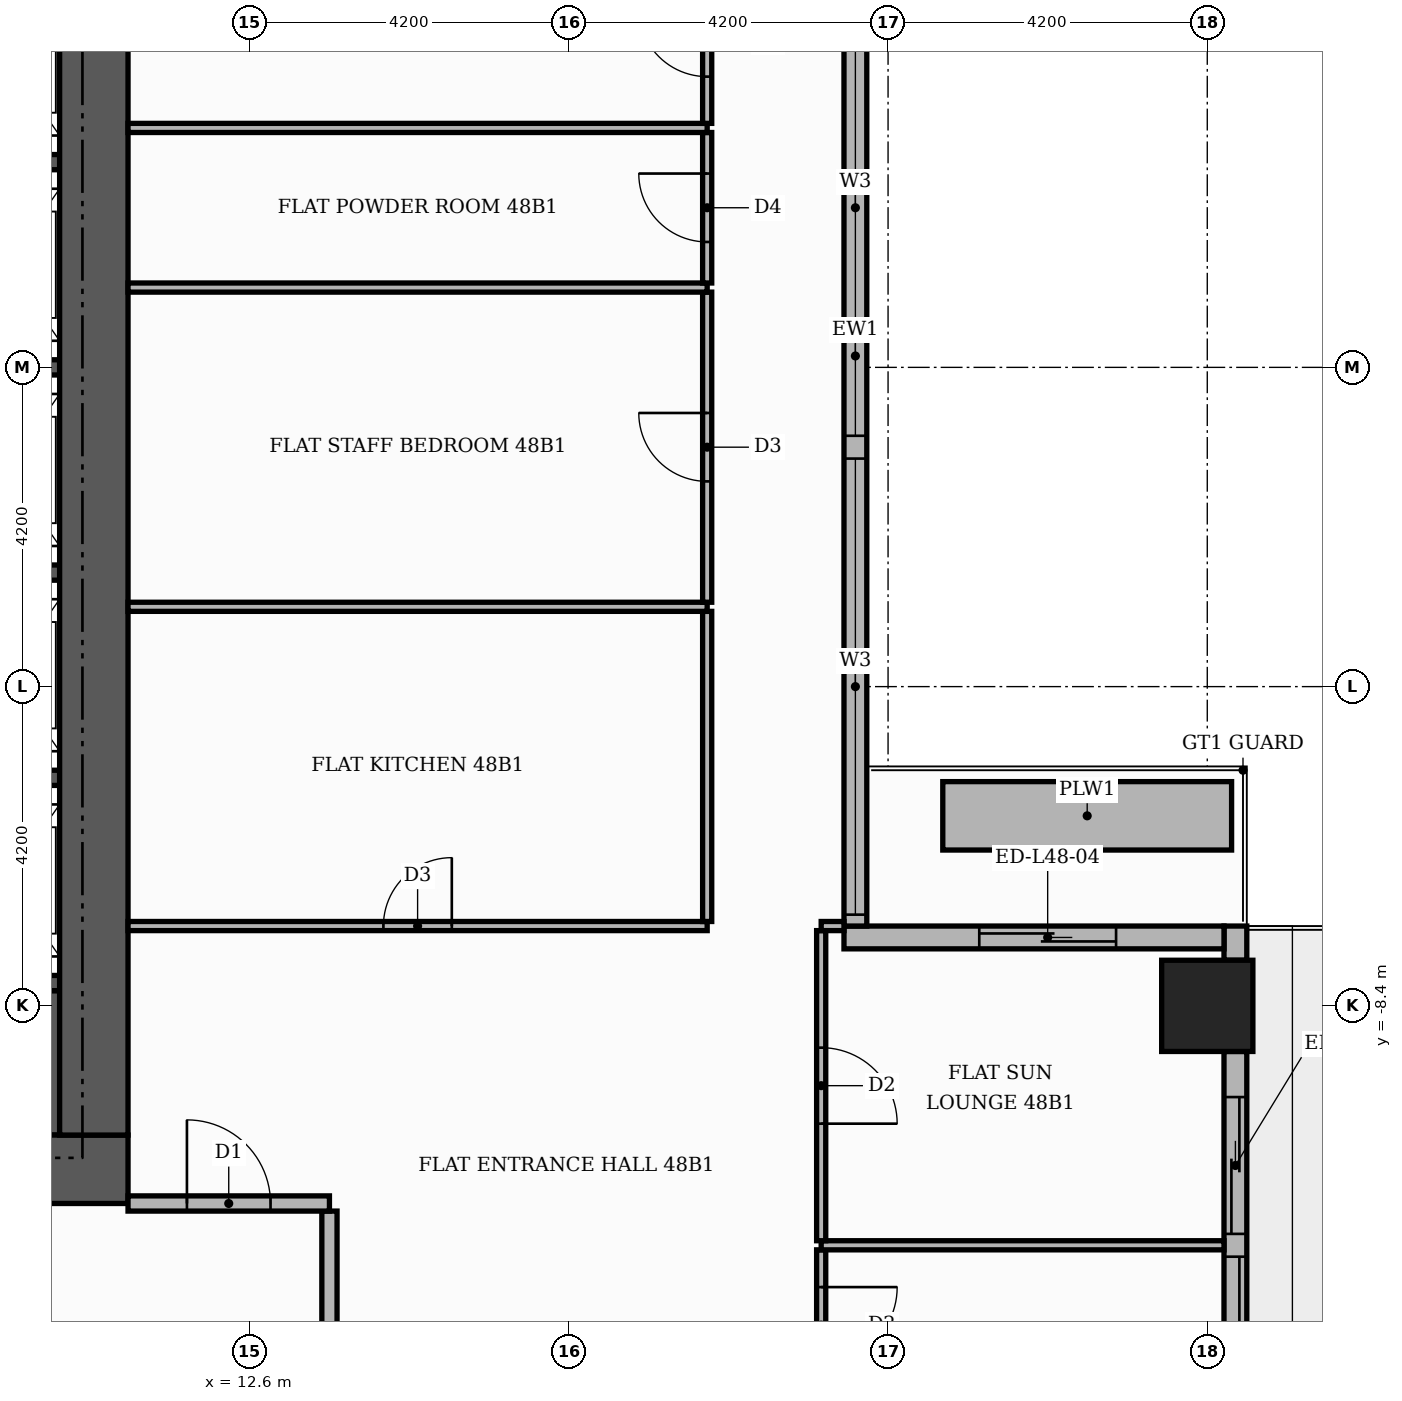
"""IFC4 building model, lengths in metres.
Left out: names, types, materials, properties, quantities, classifications, styles, units other than length and angle.
Written with IfcOpenShell. Run it as: python <this file> out.ifc"""

import sys

from ifc_helpers import new_model, si_unit, direction, frame, frame_2d, origin, origin_2d, place, context, subcontext, project, spatial, rectangle, extrude, element, fill, save


model = new_model("IFC4")
c1 = context("Model", 3, precision=1e-05, world=origin(), true_north=direction((0.0, 1.0)))
c2 = subcontext(c1, "Body", "Model", "MODEL_VIEW")
j1 = project(units=[si_unit("LENGTHUNIT", "METRE"), si_unit("PLANEANGLEUNIT", "RADIAN")], contexts=[c1])
p1 = place(None, origin())
s1 = spatial("IfcSite", under=j1, at=p1, CompositionType="ELEMENT")
p2 = place(p1, origin())
s2 = spatial("IfcBuilding", under=s1, at=p2, CompositionType="ELEMENT")
p3 = place(p2, frame((0.0, 0.0, 204.0)))
s3 = spatial("IfcBuildingStorey", under=s2, at=p3, CompositionType="ELEMENT", Elevation=204.0)
p4 = place(p3, frame((5.5, -9.15, 0.0), z_axis=(0.0, 0.0, 1.0), x_axis=(1.0, 0.0, 0.0)))
e1 = element("IfcWall", 1, at=p4, inside=s3, PredefinedType="SHEAR", context=c2, shape_type="SweptSolid", body=[
    extrude(rectangle(XDim=4.6, YDim=1.9, at=frame_2d((2.3, 0.0))), origin(), (0.0, 0.0, 1.0), 3.48),
])
for number, where, z_axis, x_axis in (
    (2, (8.1, -8.1, 0.0), (0.0, 0.0, 1.0), (1.0, 0.0, 0.0)),
    (3, (8.1, -5.4, 0.0), (0.0, 0.0, 1.0), (1.0, 0.0, 0.0)),
    (4, (8.1, -2.7, 0.0), (0.0, 0.0, 1.0), (1.0, 0.0, 0.0)),
    (5, (8.1, 0.0, 0.0), (0.0, 0.0, 1.0), (1.0, 0.0, 0.0)),
    (6, (8.1, 2.7, 0.0), (0.0, 0.0, 1.0), (1.0, 0.0, 0.0)),
):
    element("IfcWall", number, at=place(p3, frame(where, z_axis=z_axis, x_axis=x_axis)), inside=s3, PredefinedType="SHEAR", context=c2, shape_type="SweptSolid", body=[
        extrude(rectangle(XDim=2.0, YDim=0.2, at=frame_2d((1.0, 0.0))), origin(), (0.0, 0.0, 1.0), 3.48),
    ])
p5 = place(p3, frame((-11.0, -10.55, 0.0), z_axis=(0.0, 0.0, 1.0), x_axis=(1.0, 0.0, 0.0)))
e7 = element("IfcWall", 7, at=p5, inside=s3, PredefinedType="SHEAR", context=c2, shape_type="SweptSolid", body=[
    extrude(rectangle(XDim=22.0, YDim=0.9, at=frame_2d((11.0, 0.0))), origin(), (0.0, 0.0, 1.0), 3.48),
])
p6 = place(p5, frame((7.4, 0.0, 0.0)))
e8 = element("IfcOpeningElement", 8, at=p6, cuts=e7, PredefinedType="OPENING", context=c2, shape_type="SweptSolid", body=[
    extrude(rectangle(XDim=1.8, YDim=2.2, at=frame_2d((0.9, 1.1))), frame((0.0, 0.46, 0.0), z_axis=(0.0, -1.0, 0.0), x_axis=(1.0, 0.0, 0.0)), (0.0, 0.0, 1.0), 0.92),
])
p7 = place(p3, frame((10.55, -10.1, 0.0), z_axis=(0.0, 0.0, 1.0), x_axis=(0.0, 1.0, 0.0)))
e9 = element("IfcWall", 9, at=p7, inside=s3, PredefinedType="SHEAR", context=c2, shape_type="SweptSolid", body=[
    extrude(rectangle(XDim=20.2, YDim=0.9, at=frame_2d((10.1, 0.0))), origin(), (0.0, 0.0, 1.0), 3.48),
])
p8 = place(p3, frame((25.2, -8.4, 0.0), z_axis=(0.0, 0.0, 1.0), x_axis=(1.0, 0.0, 0.0)))
e10 = element("IfcColumn", 10, at=p8, inside=s3, PredefinedType="COLUMN", context=c2, shape_type="SweptSolid", body=[
    extrude(rectangle(XDim=1.2, YDim=1.2, at=origin_2d()), origin(), (0.0, 0.0, 1.0), 3.9),
])
p9 = place(p3, frame((25.57, -16.2, 0.0), z_axis=(0.0, 0.0, 1.0), x_axis=(0.0, 1.0, 0.0)))
e11 = element("IfcWall", 11, at=p9, inside=s3, PredefinedType="STANDARD", context=c2, shape_type="SweptSolid", body=[
    extrude(rectangle(XDim=7.2, YDim=0.3, at=frame_2d((3.6, 0.0))), origin(), (0.0, 0.0, 1.0), 3.48),
])
p10 = place(p9, frame((0.6, 0.0, 0.0)))
e12 = element("IfcOpeningElement", 12, at=p10, cuts=e11, PredefinedType="OPENING", context=c2, shape_type="SweptSolid", body=[
    extrude(rectangle(XDim=3.9, YDim=2.4, at=frame_2d((1.95, 1.2))), frame((0.0, 0.16, 0.0), z_axis=(0.0, -1.0, 0.0), x_axis=(1.0, 0.0, 0.0)), (0.0, 0.0, 1.0), 0.32),
])
p11 = place(p9, frame((4.8, 0.0, 0.0)))
e13 = element("IfcOpeningElement", 13, at=p11, cuts=e11, PredefinedType="OPENING", context=c2, shape_type="SweptSolid", body=[
    extrude(rectangle(XDim=1.8, YDim=2.4, at=frame_2d((0.9, 1.2))), frame((0.0, 0.16, 0.0), z_axis=(0.0, -1.0, 0.0), x_axis=(1.0, 0.0, 0.0)), (0.0, 0.0, 1.0), 0.32),
])
p12 = place(p3, frame((25.57, -7.8, 0.0), z_axis=(0.0, 0.0, 1.0), x_axis=(0.0, 1.0, 0.0)))
e14 = element("IfcWall", 14, at=p12, inside=s3, PredefinedType="STANDARD", context=c2, shape_type="SweptSolid", body=[
    extrude(rectangle(XDim=0.45, YDim=0.3, at=frame_2d((0.225, 0.0))), origin(), (0.0, 0.0, 1.0), 3.48),
])
p13 = place(p3, frame((25.42, -7.5, 0.0), z_axis=(0.0, 0.0, 1.0), x_axis=(-1.0, 0.0, 0.0)))
e15 = element("IfcWall", 15, at=p13, inside=s3, PredefinedType="STANDARD", context=c2, shape_type="SweptSolid", body=[
    extrude(rectangle(XDim=5.0, YDim=0.3, at=frame_2d((2.5, 0.0))), origin(), (0.0, 0.0, 1.0), 3.48),
])
p14 = place(p13, frame((1.42, 0.0, 0.0)))
e16 = element("IfcOpeningElement", 16, at=p14, cuts=e15, PredefinedType="OPENING", context=c2, shape_type="SweptSolid", body=[
    extrude(rectangle(XDim=1.8, YDim=2.4, at=frame_2d((0.9, 1.2))), frame((0.0, 0.16, 0.0), z_axis=(0.0, -1.0, 0.0), x_axis=(1.0, 0.0, 0.0)), (0.0, 0.0, 1.0), 0.32),
])
p15 = place(p3, frame((20.57, -7.35, 0.0), z_axis=(0.0, 0.0, 1.0), x_axis=(0.0, 1.0, 0.0)))
e17 = element("IfcWall", 17, at=p15, inside=s3, PredefinedType="STANDARD", context=c2, shape_type="SweptSolid", body=[
    extrude(rectangle(XDim=15.0, YDim=0.3, at=frame_2d((7.5, 0.0))), origin(), (0.0, 0.0, 1.0), 3.48),
])
p16 = place(p15, frame((0.15, 0.0, 0.9)))
e18 = element("IfcOpeningElement", 18, at=p16, cuts=e17, PredefinedType="OPENING", context=c2, shape_type="SweptSolid", body=[
    extrude(rectangle(XDim=6.0, YDim=2.1, at=frame_2d((3.0, 1.05))), frame((0.0, 0.16, 0.0), z_axis=(0.0, -1.0, 0.0), x_axis=(1.0, 0.0, 0.0)), (0.0, 0.0, 1.0), 0.32),
])
p17 = place(p15, frame((6.45, 0.0, 0.9)))
e19 = element("IfcOpeningElement", 19, at=p17, cuts=e17, PredefinedType="OPENING", context=c2, shape_type="SweptSolid", body=[
    extrude(rectangle(XDim=6.0, YDim=2.1, at=frame_2d((3.0, 1.05))), frame((0.0, 0.16, 0.0), z_axis=(0.0, -1.0, 0.0), x_axis=(1.0, 0.0, 0.0)), (0.0, 0.0, 1.0), 0.32),
])
p18 = place(p15, frame((12.75, 0.0, 0.9)))
e20 = element("IfcOpeningElement", 20, at=p18, cuts=e17, PredefinedType="OPENING", context=c2, shape_type="SweptSolid", body=[
    extrude(rectangle(XDim=1.8, YDim=2.1, at=frame_2d((0.9, 1.05))), frame((0.0, 0.16, 0.0), z_axis=(0.0, -1.0, 0.0), x_axis=(1.0, 0.0, 0.0)), (0.0, 0.0, 1.0), 0.32),
])
p19 = place(p3, frame((21.72, -5.9, 0.0), z_axis=(0.0, 0.0, 1.0), x_axis=(1.0, 0.0, 0.0)))
e21 = element("IfcWall", 21, at=p19, inside=s3, PredefinedType="MOVABLE", context=c2, shape_type="SweptSolid", body=[
    extrude(rectangle(XDim=3.8, YDim=0.9, at=frame_2d((1.9, 0.0))), origin(), (0.0, 0.0, 1.0), 0.6),
])
p20 = place(p3, frame((20.12, -13.59, 0.0), z_axis=(0.0, 0.0, 1.0), x_axis=(0.0, 1.0, 0.0)))
e22 = element("IfcWall", 22, at=p20, inside=s3, PredefinedType="PARTITIONING", context=c2, shape_type="SweptSolid", body=[
    extrude(rectangle(XDim=1.98, YDim=0.12, at=frame_2d((0.99, 0.0))), origin(), (0.0, 0.0, 1.0), 3.48),
])
p21 = place(p20, frame((0.49, 0.0, 0.0)))
e23 = element("IfcOpeningElement", 23, at=p21, cuts=e22, PredefinedType="OPENING", context=c2, shape_type="SweptSolid", body=[
    extrude(rectangle(XDim=1.0, YDim=2.1, at=frame_2d((0.5, 1.05))), frame((0.0, 0.07, 0.0), z_axis=(0.0, -1.0, 0.0), x_axis=(1.0, 0.0, 0.0)), (0.0, 0.0, 1.0), 0.14),
])
p22 = place(p3, frame((13.65, -13.55, 0.0), z_axis=(0.0, 0.0, 1.0), x_axis=(0.0, 1.0, 0.0)))
e24 = element("IfcWall", 24, at=p22, inside=s3, PredefinedType="PARTITIONING", context=c2, shape_type="SweptSolid", body=[
    extrude(rectangle(XDim=2.45, YDim=0.2, at=frame_2d((1.225, 0.0))), origin(), (0.0, 0.0, 1.0), 3.48),
])
p23 = place(p3, frame((20.12, -11.55, 0.0), z_axis=(0.0, 0.0, 1.0), x_axis=(1.0, 0.0, 0.0)))
e25 = element("IfcWall", 25, at=p23, inside=s3, PredefinedType="PARTITIONING", context=c2, shape_type="SweptSolid", body=[
    extrude(rectangle(XDim=5.3, YDim=0.12, at=frame_2d((2.65, 0.0))), origin(), (0.0, 0.0, 1.0), 3.48),
])
p24 = place(p3, frame((20.12, -11.49, 0.0), z_axis=(0.0, 0.0, 1.0), x_axis=(0.0, 1.0, 0.0)))
e26 = element("IfcWall", 26, at=p24, inside=s3, PredefinedType="PARTITIONING", context=c2, shape_type="SweptSolid", body=[
    extrude(rectangle(XDim=4.08, YDim=0.12, at=frame_2d((2.04, 0.0))), origin(), (0.0, 0.0, 1.0), 3.48),
])
p25 = place(p24, frame((1.54, 0.0, 0.0)))
e27 = element("IfcOpeningElement", 27, at=p25, cuts=e26, PredefinedType="OPENING", context=c2, shape_type="SweptSolid", body=[
    extrude(rectangle(XDim=1.0, YDim=2.1, at=frame_2d((0.5, 1.05))), frame((0.0, 0.07, 0.0), z_axis=(0.0, -1.0, 0.0), x_axis=(1.0, 0.0, 0.0)), (0.0, 0.0, 1.0), 0.14),
])
p26 = place(p3, frame((11.0, -11.0, 0.0), z_axis=(0.0, 0.0, 1.0), x_axis=(1.0, 0.0, 0.0)))
e28 = element("IfcWall", 28, at=p26, inside=s3, PredefinedType="PARTITIONING", context=c2, shape_type="SweptSolid", body=[
    extrude(rectangle(XDim=2.65, YDim=0.2, at=frame_2d((1.325, 0.0))), origin(), (0.0, 0.0, 1.0), 3.48),
])
p27 = place(p26, frame((0.775, 0.0, 0.0)))
e29 = element("IfcOpeningElement", 29, at=p27, cuts=e28, PredefinedType="OPENING", context=c2, shape_type="SweptSolid", body=[
    extrude(rectangle(XDim=1.1, YDim=2.4, at=frame_2d((0.55, 1.2))), frame((0.0, 0.11, 0.0), z_axis=(0.0, -1.0, 0.0), x_axis=(1.0, 0.0, 0.0)), (0.0, 0.0, 1.0), 0.22),
])
p28 = place(p3, frame((11.0, -7.35, 0.0), z_axis=(0.0, 0.0, 1.0), x_axis=(1.0, 0.0, 0.0)))
e30 = element("IfcWall", 30, at=p28, inside=s3, PredefinedType="PARTITIONING", context=c2, shape_type="SweptSolid", body=[
    extrude(rectangle(XDim=7.62, YDim=0.12, at=frame_2d((3.81, 0.0))), origin(), (0.0, 0.0, 1.0), 3.48),
])
p29 = place(p28, frame((3.36, 0.0, 0.0)))
e31 = element("IfcOpeningElement", 31, at=p29, cuts=e30, PredefinedType="OPENING", context=c2, shape_type="SweptSolid", body=[
    extrude(rectangle(XDim=0.9, YDim=2.1, at=frame_2d((0.45, 1.05))), frame((0.0, 0.07, 0.0), z_axis=(0.0, -1.0, 0.0), x_axis=(1.0, 0.0, 0.0)), (0.0, 0.0, 1.0), 0.14),
])
p30 = place(p3, frame((20.12, -7.35, 0.0), z_axis=(0.0, 0.0, 1.0), x_axis=(1.0, 0.0, 0.0)))
e32 = element("IfcWall", 32, at=p30, inside=s3, PredefinedType="PARTITIONING", context=c2, shape_type="SweptSolid", body=[
    extrude(rectangle(XDim=0.3, YDim=0.12, at=frame_2d((0.15, 0.0))), origin(), (0.0, 0.0, 1.0), 3.48),
])
p31 = place(p3, frame((18.62, -7.29, 0.0), z_axis=(0.0, 0.0, 1.0), x_axis=(0.0, 1.0, 0.0)))
e33 = element("IfcWall", 33, at=p31, inside=s3, PredefinedType="PARTITIONING", context=c2, shape_type="SweptSolid", body=[
    extrude(rectangle(XDim=4.08, YDim=0.12, at=frame_2d((2.04, 0.0))), origin(), (0.0, 0.0, 1.0), 3.48),
])
p32 = place(p3, frame((11.0, -3.15, 0.0), z_axis=(0.0, 0.0, 1.0), x_axis=(1.0, 0.0, 0.0)))
e34 = element("IfcWall", 34, at=p32, inside=s3, PredefinedType="PARTITIONING", context=c2, shape_type="SweptSolid", body=[
    extrude(rectangle(XDim=7.62, YDim=0.12, at=frame_2d((3.81, 0.0))), origin(), (0.0, 0.0, 1.0), 3.48),
])
p33 = place(p3, frame((18.62, -3.09, 0.0), z_axis=(0.0, 0.0, 1.0), x_axis=(0.0, 1.0, 0.0)))
e35 = element("IfcWall", 35, at=p33, inside=s3, PredefinedType="PARTITIONING", context=c2, shape_type="SweptSolid", body=[
    extrude(rectangle(XDim=4.08, YDim=0.12, at=frame_2d((2.04, 0.0))), origin(), (0.0, 0.0, 1.0), 3.48),
])
p34 = place(p33, frame((1.59, 0.0, 0.0)))
e36 = element("IfcOpeningElement", 36, at=p34, cuts=e35, PredefinedType="OPENING", context=c2, shape_type="SweptSolid", body=[
    extrude(rectangle(XDim=0.9, YDim=2.1, at=frame_2d((0.45, 1.05))), frame((0.0, 0.07, 0.0), z_axis=(0.0, -1.0, 0.0), x_axis=(1.0, 0.0, 0.0)), (0.0, 0.0, 1.0), 0.14),
])
p35 = place(p3, frame((11.0, 1.05, 0.0), z_axis=(0.0, 0.0, 1.0), x_axis=(1.0, 0.0, 0.0)))
e37 = element("IfcWall", 37, at=p35, inside=s3, PredefinedType="PARTITIONING", context=c2, shape_type="SweptSolid", body=[
    extrude(rectangle(XDim=7.62, YDim=0.12, at=frame_2d((3.81, 0.0))), origin(), (0.0, 0.0, 1.0), 3.48),
])
p36 = place(p3, frame((18.62, 1.11, 0.0), z_axis=(0.0, 0.0, 1.0), x_axis=(0.0, 1.0, 0.0)))
e38 = element("IfcWall", 38, at=p36, inside=s3, PredefinedType="PARTITIONING", context=c2, shape_type="SweptSolid", body=[
    extrude(rectangle(XDim=1.98, YDim=0.12, at=frame_2d((0.99, 0.0))), origin(), (0.0, 0.0, 1.0), 3.48),
])
p37 = place(p36, frame((0.54, 0.0, 0.0)))
e39 = element("IfcOpeningElement", 39, at=p37, cuts=e38, PredefinedType="OPENING", context=c2, shape_type="SweptSolid", body=[
    extrude(rectangle(XDim=0.9, YDim=2.1, at=frame_2d((0.45, 1.05))), frame((0.0, 0.07, 0.0), z_axis=(0.0, -1.0, 0.0), x_axis=(1.0, 0.0, 0.0)), (0.0, 0.0, 1.0), 0.14),
])
p38 = place(p3, frame((11.0, 3.15, 0.0), z_axis=(0.0, 0.0, 1.0), x_axis=(1.0, 0.0, 0.0)))
e40 = element("IfcWall", 40, at=p38, inside=s3, PredefinedType="PARTITIONING", context=c2, shape_type="SweptSolid", body=[
    extrude(rectangle(XDim=7.62, YDim=0.12, at=frame_2d((3.81, 0.0))), origin(), (0.0, 0.0, 1.0), 3.48),
])
p39 = place(p3, frame((18.62, 3.21, 0.0), z_axis=(0.0, 0.0, 1.0), x_axis=(0.0, 1.0, 0.0)))
e41 = element("IfcWall", 41, at=p39, inside=s3, PredefinedType="PARTITIONING", context=c2, shape_type="SweptSolid", body=[
    extrude(rectangle(XDim=2.13, YDim=0.12, at=frame_2d((1.065, 0.0))), origin(), (0.0, 0.0, 1.0), 3.48),
])
p40 = place(p39, frame((0.615, 0.0, 0.0)))
e42 = element("IfcOpeningElement", 42, at=p40, cuts=e41, PredefinedType="OPENING", context=c2, shape_type="SweptSolid", body=[
    extrude(rectangle(XDim=0.9, YDim=2.1, at=frame_2d((0.45, 1.05))), frame((0.0, 0.07, 0.0), z_axis=(0.0, -1.0, 0.0), x_axis=(1.0, 0.0, 0.0)), (0.0, 0.0, 1.0), 0.14),
])
p41 = place(p10, origin())
e43 = element("IfcDoor", 43, at=p41, inside=s3, OperationType="SLIDING_TO_LEFT", PredefinedType="DOOR", context=c2, shape_type="SweptSolid", body=[
    extrude(rectangle(XDim=3.9, YDim=2.4, at=frame_2d((1.95, 1.2))), frame((0.0, 0.025, 0.0), z_axis=(0.0, -1.0, 0.0), x_axis=(1.0, 0.0, 0.0)), (0.0, 0.0, 1.0), 0.05),
])
fill(e12, e43)
p42 = place(p11, origin())
e44 = element("IfcDoor", 44, at=p42, inside=s3, OperationType="SLIDING_TO_RIGHT", PredefinedType="DOOR", context=c2, shape_type="SweptSolid", body=[
    extrude(rectangle(XDim=1.8, YDim=2.4, at=frame_2d((0.9, 1.2))), frame((0.0, 0.025, 0.0), z_axis=(0.0, -1.0, 0.0), x_axis=(1.0, 0.0, 0.0)), (0.0, 0.0, 1.0), 0.05),
])
fill(e13, e44)
p43 = place(p14, origin())
e45 = element("IfcDoor", 45, at=p43, inside=s3, OperationType="SLIDING_TO_LEFT", PredefinedType="DOOR", context=c2, shape_type="SweptSolid", body=[
    extrude(rectangle(XDim=1.8, YDim=2.4, at=frame_2d((0.9, 1.2))), frame((0.0, 0.025, 0.0), z_axis=(0.0, -1.0, 0.0), x_axis=(1.0, 0.0, 0.0)), (0.0, 0.0, 1.0), 0.05),
])
fill(e16, e45)
p44 = place(p16, origin())
e46 = element("IfcWindow", 46, at=p44, inside=s3, PartitioningType="SINGLE_PANEL", PredefinedType="WINDOW", context=c2, shape_type="SweptSolid", body=[
    extrude(rectangle(XDim=6.0, YDim=2.1, at=frame_2d((3.0, 1.05))), frame((0.0, 0.03, 0.0), z_axis=(0.0, -1.0, 0.0), x_axis=(1.0, 0.0, 0.0)), (0.0, 0.0, 1.0), 0.06),
])
fill(e18, e46)
p45 = place(p17, origin())
e47 = element("IfcWindow", 47, at=p45, inside=s3, PartitioningType="SINGLE_PANEL", PredefinedType="WINDOW", context=c2, shape_type="SweptSolid", body=[
    extrude(rectangle(XDim=6.0, YDim=2.1, at=frame_2d((3.0, 1.05))), frame((0.0, 0.03, 0.0), z_axis=(0.0, -1.0, 0.0), x_axis=(1.0, 0.0, 0.0)), (0.0, 0.0, 1.0), 0.06),
])
fill(e19, e47)
p46 = place(p27, origin())
e48 = element("IfcDoor", 48, at=p46, inside=s3, OperationType="SINGLE_SWING_LEFT", PredefinedType="DOOR", context=c2, shape_type="SweptSolid", body=[
    extrude(rectangle(XDim=1.1, YDim=2.4, at=frame_2d((0.55, 1.2))), frame((0.0, 0.025, 0.0), z_axis=(0.0, -1.0, 0.0), x_axis=(1.0, 0.0, 0.0)), (0.0, 0.0, 1.0), 0.05),
])
fill(e29, e48)
p47 = place(p29, origin())
e49 = element("IfcDoor", 49, at=p47, inside=s3, OperationType="SINGLE_SWING_RIGHT", PredefinedType="DOOR", context=c2, shape_type="SweptSolid", body=[
    extrude(rectangle(XDim=0.9, YDim=2.1, at=frame_2d((0.45, 1.05))), frame((0.0, 0.025, 0.0), z_axis=(0.0, -1.0, 0.0), x_axis=(1.0, 0.0, 0.0)), (0.0, 0.0, 1.0), 0.05),
])
fill(e31, e49)
p48 = place(p34, origin())
e50 = element("IfcDoor", 50, at=p48, inside=s3, OperationType="SINGLE_SWING_RIGHT", PredefinedType="DOOR", context=c2, shape_type="SweptSolid", body=[
    extrude(rectangle(XDim=0.9, YDim=2.1, at=frame_2d((0.45, 1.05))), frame((0.0, 0.025, 0.0), z_axis=(0.0, -1.0, 0.0), x_axis=(1.0, 0.0, 0.0)), (0.0, 0.0, 1.0), 0.05),
])
fill(e36, e50)
p49 = place(p37, origin())
e51 = element("IfcDoor", 51, at=p49, inside=s3, OperationType="SINGLE_SWING_RIGHT", PredefinedType="DOOR", context=c2, shape_type="SweptSolid", body=[
    extrude(rectangle(XDim=0.9, YDim=2.1, at=frame_2d((0.45, 1.05))), frame((0.0, 0.025, 0.0), z_axis=(0.0, -1.0, 0.0), x_axis=(1.0, 0.0, 0.0)), (0.0, 0.0, 1.0), 0.05),
])
fill(e39, e51)
p50 = place(p40, origin())
e52 = element("IfcDoor", 52, at=p50, inside=s3, OperationType="SINGLE_SWING_RIGHT", PredefinedType="DOOR", context=c2, shape_type="SweptSolid", body=[
    extrude(rectangle(XDim=0.9, YDim=2.1, at=frame_2d((0.45, 1.05))), frame((0.0, 0.025, 0.0), z_axis=(0.0, -1.0, 0.0), x_axis=(1.0, 0.0, 0.0)), (0.0, 0.0, 1.0), 0.05),
])
fill(e42, e52)
p51 = place(p21, frame((1.0, 0.0, 0.0), z_axis=(0.0, 0.0, 1.0), x_axis=(-1.0, 0.0, 0.0)))
e53 = element("IfcDoor", 53, at=p51, inside=s3, OperationType="SINGLE_SWING_RIGHT", PredefinedType="DOOR", context=c2, shape_type="SweptSolid", body=[
    extrude(rectangle(XDim=1.0, YDim=2.1, at=frame_2d((0.5, 1.05))), frame((0.0, 0.025, 0.0), z_axis=(0.0, -1.0, 0.0), x_axis=(1.0, 0.0, 0.0)), (0.0, 0.0, 1.0), 0.05),
])
fill(e23, e53)
p52 = place(p25, frame((1.0, 0.0, 0.0), z_axis=(0.0, 0.0, 1.0), x_axis=(-1.0, 0.0, 0.0)))
e54 = element("IfcDoor", 54, at=p52, inside=s3, OperationType="SINGLE_SWING_LEFT", PredefinedType="DOOR", context=c2, shape_type="SweptSolid", body=[
    extrude(rectangle(XDim=1.0, YDim=2.1, at=frame_2d((0.5, 1.05))), frame((0.0, 0.025, 0.0), z_axis=(0.0, -1.0, 0.0), x_axis=(1.0, 0.0, 0.0)), (0.0, 0.0, 1.0), 0.05),
])
fill(e27, e54)
save(model, sys.argv[1])
